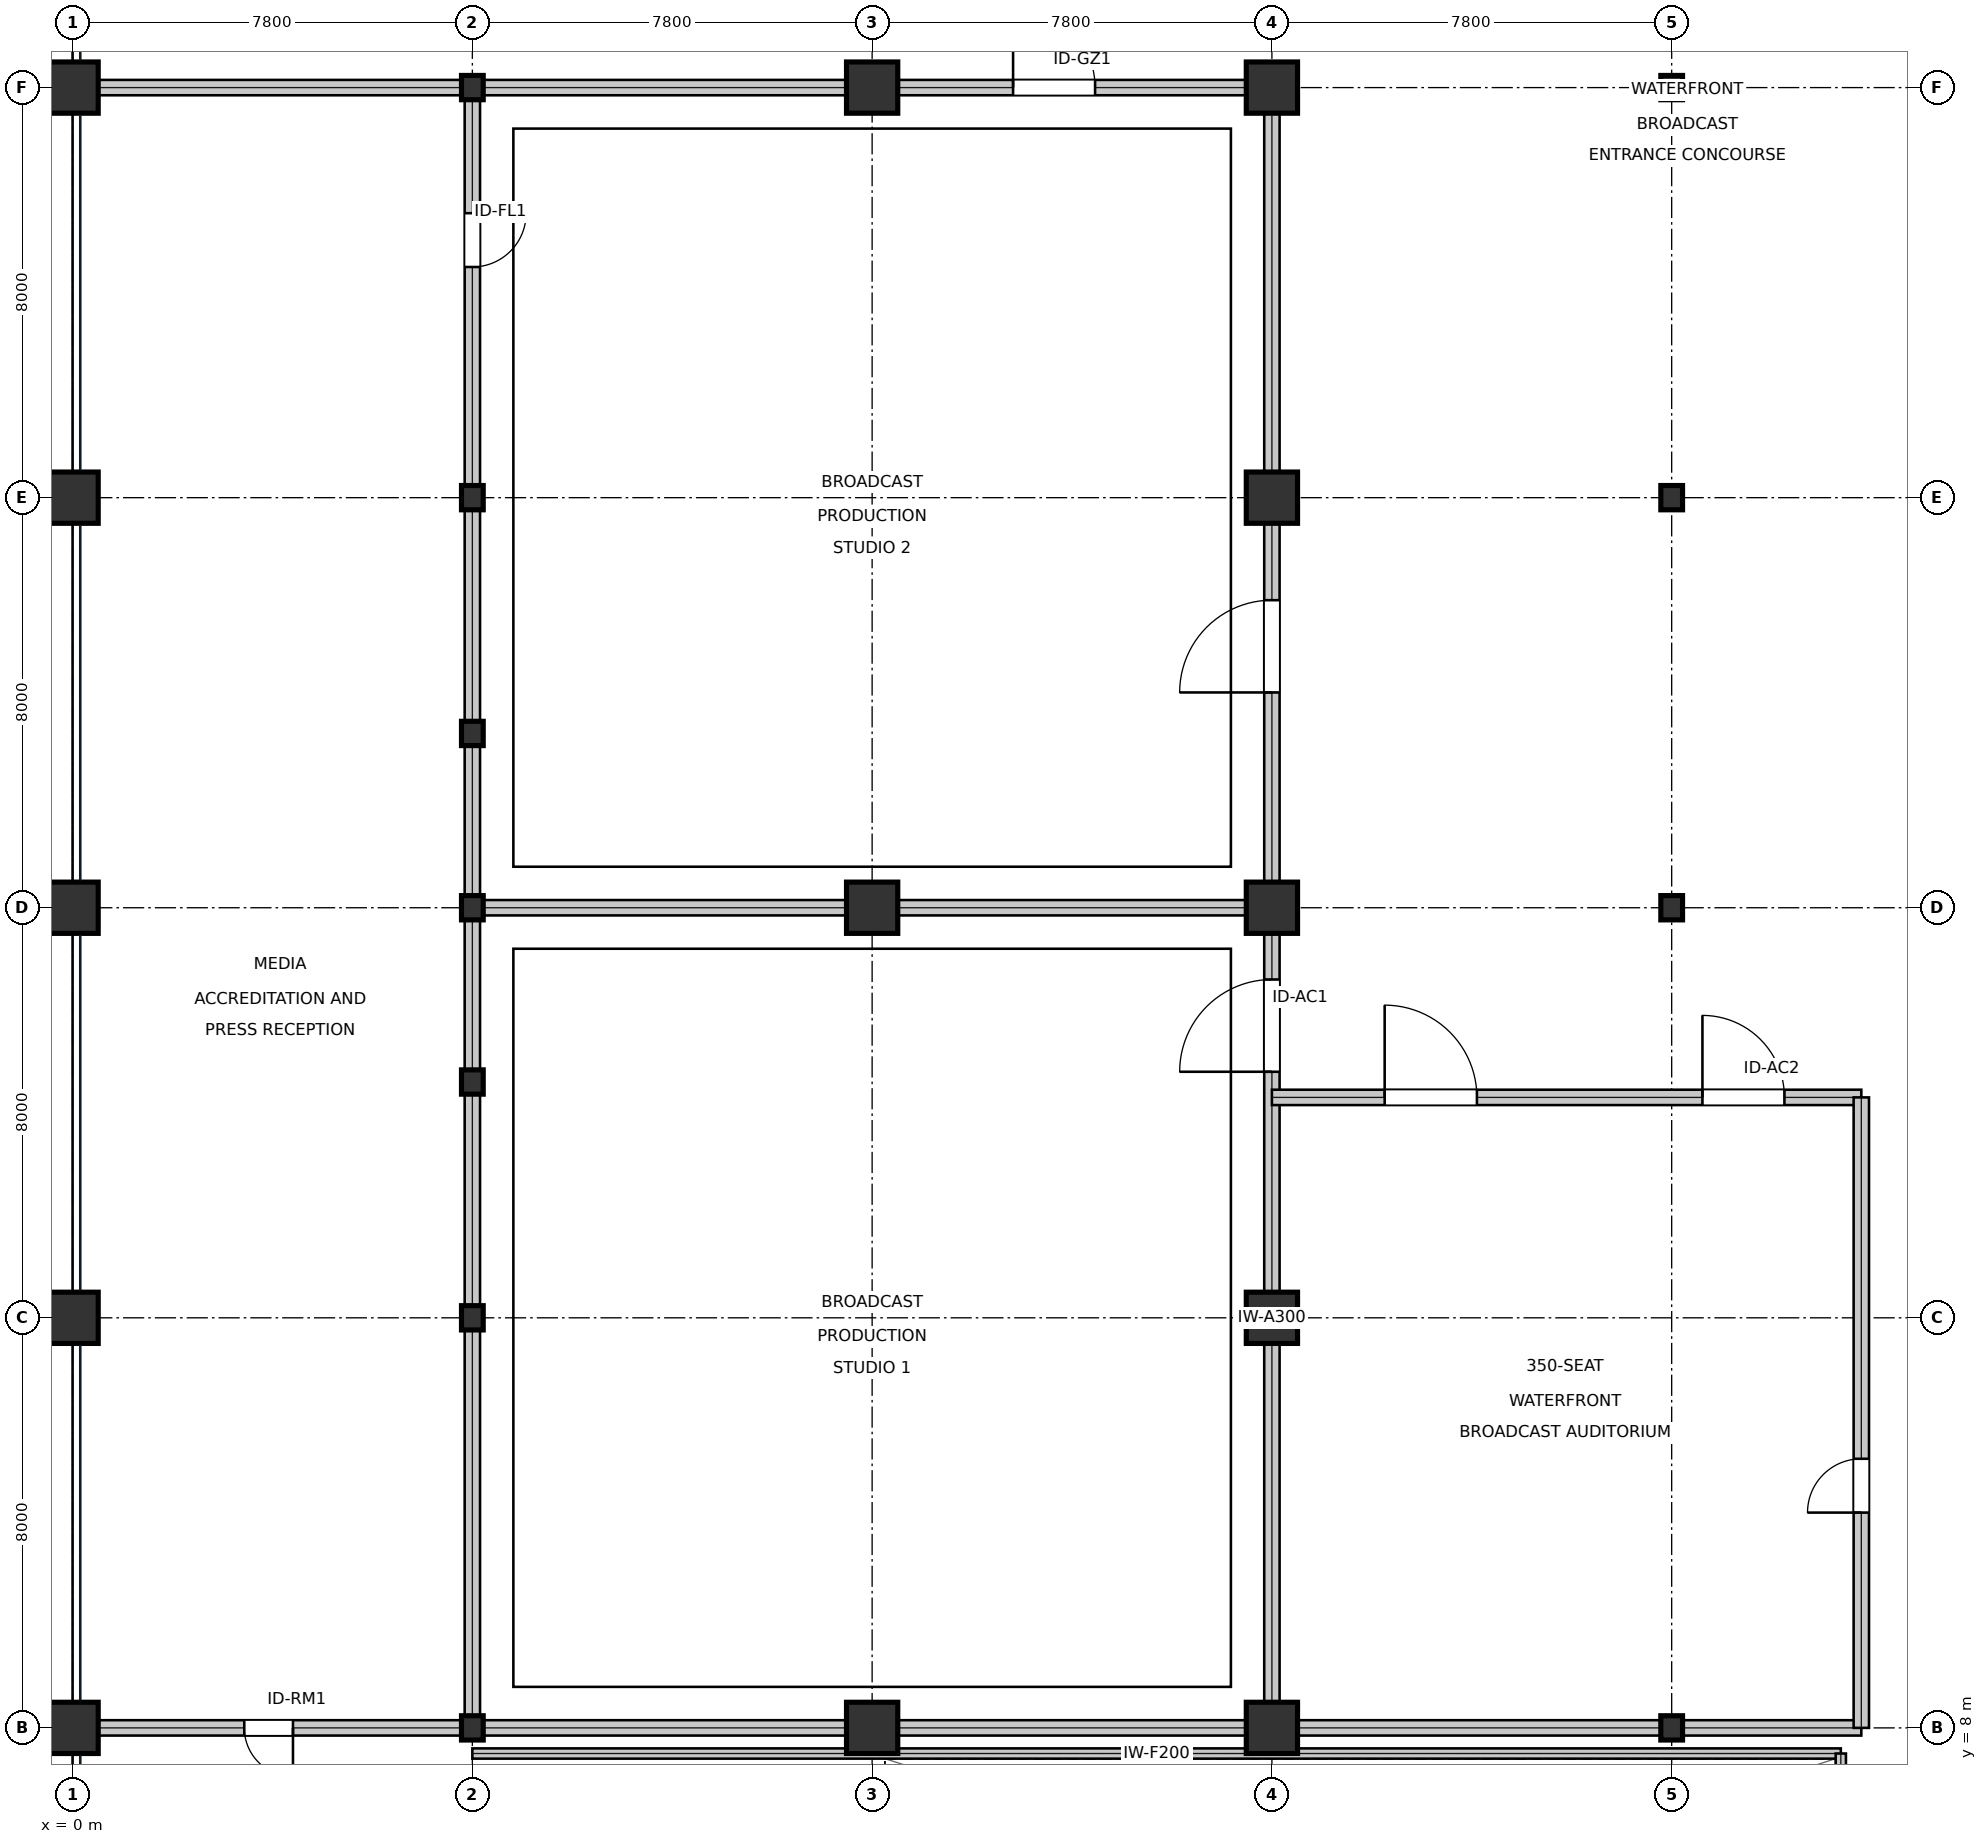
"""IFC4 building model, lengths in metres.
Left out: names, types, materials, properties, quantities, classifications, styles, units other than length and angle.
Written with IfcOpenShell. Run it as: python <this file> out.ifc"""

import sys

from ifc_helpers import new_model, si_unit, direction, frame, frame_2d, origin, origin_2d, place, context, subcontext, project, spatial, rectangle, i_section, extrude, element, fill, save


model = new_model("IFC4")
c1 = context("Model", 3, precision=1e-05, world=origin(), true_north=direction((0.0, 1.0)))
c2 = subcontext(c1, "Body", "Model", "MODEL_VIEW")
j1 = project(units=[si_unit("LENGTHUNIT", "METRE"), si_unit("PLANEANGLEUNIT", "RADIAN")], contexts=[c1])
p1 = place(None, origin())
s1 = spatial("IfcSite", under=j1, at=p1, CompositionType="ELEMENT")
p2 = place(p1, origin())
s2 = spatial("IfcBuilding", under=s1, at=p2, CompositionType="ELEMENT")
p3 = place(p2, origin())
s3 = spatial("IfcBuildingStorey", under=s2, at=p3, CompositionType="ELEMENT", Elevation=0.0)
for number, where, z_axis, x_axis in (
    (1, (0.0, 8.0, 0.0), (0.0, 0.0, 1.0), (1.0, 0.0, 0.0)),
    (2, (0.0, 16.0, 0.0), (0.0, 0.0, 1.0), (1.0, 0.0, 0.0)),
    (3, (0.0, 24.0, 0.0), (0.0, 0.0, 1.0), (1.0, 0.0, 0.0)),
    (4, (0.0, 32.0, 0.0), (0.0, 0.0, 1.0), (1.0, 0.0, 0.0)),
    (5, (0.0, 40.0, 0.0), (0.0, 0.0, 1.0), (1.0, 0.0, 0.0)),
):
    element("IfcColumn", number, at=place(p3, frame(where, z_axis=z_axis, x_axis=x_axis)), inside=s3, PredefinedType="COLUMN", context=c2, shape_type="SweptSolid", body=[
        extrude(rectangle(XDim=1.0, YDim=1.0, at=origin_2d()), origin(), (0.0, 0.0, 1.0), 5.395),
    ])
for number, where, z_axis, x_axis in (
    (6, (7.8, 8.0, 0.0), (0.0, 0.0, 1.0), (1.0, 0.0, 0.0)),
    (7, (7.8, 16.0, 0.0), (0.0, 0.0, 1.0), (1.0, 0.0, 0.0)),
    (8, (7.8, 24.0, 0.0), (0.0, 0.0, 1.0), (1.0, 0.0, 0.0)),
    (9, (7.8, 32.0, 0.0), (0.0, 0.0, 1.0), (1.0, 0.0, 0.0)),
    (10, (7.8, 40.0, 0.0), (0.0, 0.0, 1.0), (1.0, 0.0, 0.0)),
):
    element("IfcColumn", number, at=place(p3, frame(where, z_axis=z_axis, x_axis=x_axis)), inside=s3, PredefinedType="COLUMN", context=c2, shape_type="SweptSolid", body=[
        extrude(i_section(OverallWidth=0.424, OverallDepth=0.474, WebThickness=0.048, FlangeThickness=0.077, at=origin_2d()), origin(), (0.0, 0.0, 1.0), 5.395),
    ])
for number, where, z_axis, x_axis in (
    (11, (15.6, 8.0, 0.0), (0.0, 0.0, 1.0), (1.0, 0.0, 0.0)),
    (12, (15.6, 24.0, 0.0), (0.0, 0.0, 1.0), (1.0, 0.0, 0.0)),
    (13, (15.6, 40.0, 0.0), (0.0, 0.0, 1.0), (1.0, 0.0, 0.0)),
    (14, (23.4, 8.0, 0.0), (0.0, 0.0, 1.0), (1.0, 0.0, 0.0)),
    (15, (23.4, 16.0, 0.0), (0.0, 0.0, 1.0), (1.0, 0.0, 0.0)),
    (16, (23.4, 24.0, 0.0), (0.0, 0.0, 1.0), (1.0, 0.0, 0.0)),
    (17, (23.4, 32.0, 0.0), (0.0, 0.0, 1.0), (1.0, 0.0, 0.0)),
    (18, (23.4, 40.0, 0.0), (0.0, 0.0, 1.0), (1.0, 0.0, 0.0)),
):
    element("IfcColumn", number, at=place(p3, frame(where, z_axis=z_axis, x_axis=x_axis)), inside=s3, PredefinedType="COLUMN", context=c2, shape_type="SweptSolid", body=[
        extrude(rectangle(XDim=1.0, YDim=1.0, at=origin_2d()), origin(), (0.0, 0.0, 1.0), 5.395),
    ])
for number, where, z_axis, x_axis in (
    (19, (31.2, 8.0, 0.0), (0.0, 0.0, 1.0), (1.0, 0.0, 0.0)),
    (20, (31.2, 24.0, 0.0), (0.0, 0.0, 1.0), (1.0, 0.0, 0.0)),
    (21, (31.2, 32.0, 0.0), (0.0, 0.0, 1.0), (1.0, 0.0, 0.0)),
    (22, (31.2, 40.0, 0.0), (0.0, 0.0, 1.0), (1.0, 0.0, 0.0)),
):
    element("IfcColumn", number, at=place(p3, frame(where, z_axis=z_axis, x_axis=x_axis)), inside=s3, PredefinedType="COLUMN", context=c2, shape_type="SweptSolid", body=[
        extrude(i_section(OverallWidth=0.424, OverallDepth=0.474, WebThickness=0.048, FlangeThickness=0.077, at=origin_2d()), origin(), (0.0, 0.0, 1.0), 5.395),
    ])
for number, where, z_axis, x_axis in (
    (23, (7.8, 20.6, 0.0), (0.0, 0.0, 1.0), (1.0, 0.0, 0.0)),
    (24, (7.8, 27.4, 0.0), (0.0, 0.0, 1.0), (1.0, 0.0, 0.0)),
):
    element("IfcColumn", number, at=place(p3, frame(where, z_axis=z_axis, x_axis=x_axis)), inside=s3, PredefinedType="COLUMN", context=c2, shape_type="SweptSolid", body=[
        extrude(i_section(OverallWidth=0.424, OverallDepth=0.474, WebThickness=0.048, FlangeThickness=0.077, at=origin_2d()), origin(), (0.0, 0.0, 1.0), 5.394),
    ])
p4 = place(p3, frame((23.4, 8.0, 0.0), z_axis=(0.0, 0.0, 1.0), x_axis=(0.0, 1.0, 0.0)))
e25 = element("IfcWall", 25, at=p4, inside=s3, PredefinedType="PARTITIONING", context=c2, shape_type="SweptSolid", body=[
    extrude(rectangle(XDim=16.0, YDim=0.3, at=frame_2d((8.0, 0.0))), origin(), (0.0, 0.0, 1.0), 3.688),
])
p5 = place(p4, frame((12.8, 0.0, 0.0)))
e26 = element("IfcOpeningElement", 26, at=p5, cuts=e25, PredefinedType="OPENING", context=c2, shape_type="SweptSolid", body=[
    extrude(rectangle(XDim=1.8, YDim=2.4, at=frame_2d((0.9, 1.2))), frame((0.0, 0.16, 0.0), z_axis=(0.0, -1.0, 0.0), x_axis=(1.0, 0.0, 0.0)), (0.0, 0.0, 1.0), 0.32),
])
p6 = place(p3, frame((23.4, 24.0, 0.0), z_axis=(0.0, 0.0, 1.0), x_axis=(0.0, 1.0, 0.0)))
e27 = element("IfcWall", 27, at=p6, inside=s3, PredefinedType="PARTITIONING", context=c2, shape_type="SweptSolid", body=[
    extrude(rectangle(XDim=16.0, YDim=0.3, at=frame_2d((8.0, 0.0))), origin(), (0.0, 0.0, 1.0), 3.688),
])
p7 = place(p6, frame((4.2, 0.0, 0.0)))
e28 = element("IfcOpeningElement", 28, at=p7, cuts=e27, PredefinedType="OPENING", context=c2, shape_type="SweptSolid", body=[
    extrude(rectangle(XDim=1.8, YDim=2.4, at=frame_2d((0.9, 1.2))), frame((0.0, 0.16, 0.0), z_axis=(0.0, -1.0, 0.0), x_axis=(1.0, 0.0, 0.0)), (0.0, 0.0, 1.0), 0.32),
])
p8 = place(p3, frame((7.8, 24.0, 0.0), z_axis=(0.0, 0.0, 1.0), x_axis=(1.0, 0.0, 0.0)))
e29 = element("IfcWall", 29, at=p8, inside=s3, PredefinedType="PARTITIONING", context=c2, shape_type="SweptSolid", body=[
    extrude(rectangle(XDim=15.6, YDim=0.3, at=frame_2d((7.8, 0.0))), origin(), (0.0, 0.0, 1.0), 3.688),
])
p9 = place(p3, frame((7.8, 8.0, 0.0), z_axis=(0.0, 0.0, 1.0), x_axis=(0.0, 1.0, 0.0)))
e30 = element("IfcWall", 30, at=p9, inside=s3, PredefinedType="PARTITIONING", context=c2, shape_type="SweptSolid", body=[
    extrude(rectangle(XDim=32.0, YDim=0.3, at=frame_2d((16.0, 0.0))), origin(), (0.0, 0.0, 1.0), 3.688),
])
p10 = place(p9, frame((28.5, 0.0, 0.0)))
e31 = element("IfcOpeningElement", 31, at=p10, cuts=e30, PredefinedType="OPENING", context=c2, shape_type="SweptSolid", body=[
    extrude(rectangle(XDim=1.05, YDim=2.15, at=frame_2d((0.525, 1.075))), frame((0.0, 0.16, 0.0), z_axis=(0.0, -1.0, 0.0), x_axis=(1.0, 0.0, 0.0)), (0.0, 0.0, 1.0), 0.32),
])
p11 = place(p3, frame((0.15, 8.0, 0.0), z_axis=(0.0, 0.0, 1.0), x_axis=(1.0, 0.0, 0.0)))
e32 = element("IfcWall", 32, at=p11, inside=s3, PredefinedType="PARTITIONING", context=c2, shape_type="SweptSolid", body=[
    extrude(rectangle(XDim=23.25, YDim=0.3, at=frame_2d((11.625, 0.0))), origin(), (0.0, 0.0, 1.0), 3.688),
])
p12 = place(p11, frame((3.2, 0.0, 0.0)))
e33 = element("IfcOpeningElement", 33, at=p12, cuts=e32, PredefinedType="OPENING", context=c2, shape_type="SweptSolid", body=[
    extrude(rectangle(XDim=0.95, YDim=2.15, at=frame_2d((0.475, 1.075))), frame((0.0, 0.16, 0.0), z_axis=(0.0, -1.0, 0.0), x_axis=(1.0, 0.0, 0.0)), (0.0, 0.0, 1.0), 0.32),
])
p13 = place(p3, frame((0.15, 40.0, 0.0), z_axis=(0.0, 0.0, 1.0), x_axis=(1.0, 0.0, 0.0)))
e34 = element("IfcWall", 34, at=p13, inside=s3, PredefinedType="PARTITIONING", context=c2, shape_type="SweptSolid", body=[
    extrude(rectangle(XDim=23.25, YDim=0.3, at=frame_2d((11.625, 0.0))), origin(), (0.0, 0.0, 1.0), 3.688),
])
p14 = place(p13, frame((18.2, 0.0, 0.0)))
e35 = element("IfcOpeningElement", 35, at=p14, cuts=e34, PredefinedType="OPENING", context=c2, shape_type="SweptSolid", body=[
    extrude(rectangle(XDim=1.6, YDim=2.2, at=frame_2d((0.8, 1.1))), frame((0.0, 0.16, 0.0), z_axis=(0.0, -1.0, 0.0), x_axis=(1.0, 0.0, 0.0)), (0.0, 0.0, 1.0), 0.32),
])
p15 = place(p3, frame((23.4, 20.3, 0.0), z_axis=(0.0, 0.0, 1.0), x_axis=(1.0, 0.0, 0.0)))
e36 = element("IfcWall", 36, at=p15, inside=s3, PredefinedType="PARTITIONING", context=c2, shape_type="SweptSolid", body=[
    extrude(rectangle(XDim=11.5, YDim=0.3, at=frame_2d((5.75, 0.0))), origin(), (0.0, 0.0, 1.0), 3.688),
])
p16 = place(p15, frame((2.2, 0.0, 0.0)))
e37 = element("IfcOpeningElement", 37, at=p16, cuts=e36, PredefinedType="OPENING", context=c2, shape_type="SweptSolid", body=[
    extrude(rectangle(XDim=1.8, YDim=2.4, at=frame_2d((0.9, 1.2))), frame((0.0, 0.16, 0.0), z_axis=(0.0, -1.0, 0.0), x_axis=(1.0, 0.0, 0.0)), (0.0, 0.0, 1.0), 0.32),
])
p17 = place(p15, frame((8.4, 0.0, 0.0)))
e38 = element("IfcOpeningElement", 38, at=p17, cuts=e36, PredefinedType="OPENING", context=c2, shape_type="SweptSolid", body=[
    extrude(rectangle(XDim=1.6, YDim=2.4, at=frame_2d((0.8, 1.2))), frame((0.0, 0.16, 0.0), z_axis=(0.0, -1.0, 0.0), x_axis=(1.0, 0.0, 0.0)), (0.0, 0.0, 1.0), 0.32),
])
p18 = place(p3, frame((23.4, 8.0, 0.0), z_axis=(0.0, 0.0, 1.0), x_axis=(1.0, 0.0, 0.0)))
e39 = element("IfcWall", 39, at=p18, inside=s3, PredefinedType="PARTITIONING", context=c2, shape_type="SweptSolid", body=[
    extrude(rectangle(XDim=11.5, YDim=0.3, at=frame_2d((5.75, 0.0))), origin(), (0.0, 0.0, 1.0), 3.688),
])
p19 = place(p3, frame((34.9, 8.0, 0.0), z_axis=(0.0, 0.0, 1.0), x_axis=(0.0, 1.0, 0.0)))
e40 = element("IfcWall", 40, at=p19, inside=s3, PredefinedType="PARTITIONING", context=c2, shape_type="SweptSolid", body=[
    extrude(rectangle(XDim=12.3, YDim=0.3, at=frame_2d((6.15, 0.0))), origin(), (0.0, 0.0, 1.0), 3.688),
])
p20 = place(p19, frame((4.2, 0.0, 0.0)))
e41 = element("IfcOpeningElement", 41, at=p20, cuts=e40, PredefinedType="OPENING", context=c2, shape_type="SweptSolid", body=[
    extrude(rectangle(XDim=1.05, YDim=2.15, at=frame_2d((0.525, 1.075))), frame((0.0, 0.16, 0.0), z_axis=(0.0, -1.0, 0.0), x_axis=(1.0, 0.0, 0.0)), (0.0, 0.0, 1.0), 0.32),
])
p21 = place(p3, frame((7.8, 7.5, 0.0), z_axis=(0.0, 0.0, 1.0), x_axis=(1.0, 0.0, 0.0)))
e42 = element("IfcWall", 42, at=p21, inside=s3, PredefinedType="SOLIDWALL", context=c2, shape_type="SweptSolid", body=[
    extrude(rectangle(XDim=26.7, YDim=0.2, at=frame_2d((13.35, 0.0))), origin(), (0.0, 0.0, 1.0), 4.415),
])
p22 = place(p3, frame((34.5, 1.3, 0.0), z_axis=(0.0, 0.0, 1.0), x_axis=(0.0, 1.0, 0.0)))
e43 = element("IfcWall", 43, at=p22, inside=s3, PredefinedType="SOLIDWALL", context=c2, shape_type="SweptSolid", body=[
    extrude(rectangle(XDim=6.2, YDim=0.2, at=frame_2d((3.1, 0.0))), origin(), (0.0, 0.0, 1.0), 4.701),
])
p23 = place(p5, origin())
e44 = element("IfcDoor", 44, at=p23, inside=s3, OperationType="SINGLE_SWING_LEFT", PredefinedType="DOOR", context=c2, shape_type="SweptSolid", body=[
    extrude(rectangle(XDim=1.8, YDim=2.4, at=frame_2d((0.9, 1.2))), frame((0.0, 0.025, 0.0), z_axis=(0.0, -1.0, 0.0), x_axis=(1.0, 0.0, 0.0)), (0.0, 0.0, 1.0), 0.05),
])
fill(e26, e44)
p24 = place(p7, origin())
e45 = element("IfcDoor", 45, at=p24, inside=s3, OperationType="SINGLE_SWING_LEFT", PredefinedType="DOOR", context=c2, shape_type="SweptSolid", body=[
    extrude(rectangle(XDim=1.8, YDim=2.4, at=frame_2d((0.9, 1.2))), frame((0.0, 0.025, 0.0), z_axis=(0.0, -1.0, 0.0), x_axis=(1.0, 0.0, 0.0)), (0.0, 0.0, 1.0), 0.05),
])
fill(e28, e45)
p25 = place(p10, frame((1.05, 0.0, 0.0), z_axis=(0.0, 0.0, 1.0), x_axis=(-1.0, 0.0, 0.0)))
e46 = element("IfcDoor", 46, at=p25, inside=s3, OperationType="SINGLE_SWING_LEFT", PredefinedType="DOOR", context=c2, shape_type="SweptSolid", body=[
    extrude(rectangle(XDim=1.05, YDim=2.15, at=frame_2d((0.525, 1.075))), frame((0.0, 0.025, 0.0), z_axis=(0.0, -1.0, 0.0), x_axis=(1.0, 0.0, 0.0)), (0.0, 0.0, 1.0), 0.05),
])
fill(e31, e46)
p26 = place(p12, frame((0.95, 0.0, 0.0), z_axis=(0.0, 0.0, 1.0), x_axis=(-1.0, 0.0, 0.0)))
e47 = element("IfcDoor", 47, at=p26, inside=s3, OperationType="SINGLE_SWING_LEFT", PredefinedType="DOOR", context=c2, shape_type="SweptSolid", body=[
    extrude(rectangle(XDim=0.95, YDim=2.15, at=frame_2d((0.475, 1.075))), frame((0.0, 0.025, 0.0), z_axis=(0.0, -1.0, 0.0), x_axis=(1.0, 0.0, 0.0)), (0.0, 0.0, 1.0), 0.05),
])
fill(e33, e47)
p27 = place(p14, origin())
e48 = element("IfcDoor", 48, at=p27, inside=s3, OperationType="SINGLE_SWING_LEFT", PredefinedType="DOOR", context=c2, shape_type="SweptSolid", body=[
    extrude(rectangle(XDim=1.6, YDim=2.2, at=frame_2d((0.8, 1.1))), frame((0.0, 0.025, 0.0), z_axis=(0.0, -1.0, 0.0), x_axis=(1.0, 0.0, 0.0)), (0.0, 0.0, 1.0), 0.05),
])
fill(e35, e48)
p28 = place(p16, origin())
e49 = element("IfcDoor", 49, at=p28, inside=s3, OperationType="SINGLE_SWING_LEFT", PredefinedType="DOOR", context=c2, shape_type="SweptSolid", body=[
    extrude(rectangle(XDim=1.8, YDim=2.4, at=frame_2d((0.9, 1.2))), frame((0.0, 0.025, 0.0), z_axis=(0.0, -1.0, 0.0), x_axis=(1.0, 0.0, 0.0)), (0.0, 0.0, 1.0), 0.05),
])
fill(e37, e49)
p29 = place(p17, origin())
e50 = element("IfcDoor", 50, at=p29, inside=s3, OperationType="SINGLE_SWING_LEFT", PredefinedType="DOOR", context=c2, shape_type="SweptSolid", body=[
    extrude(rectangle(XDim=1.6, YDim=2.4, at=frame_2d((0.8, 1.2))), frame((0.0, 0.025, 0.0), z_axis=(0.0, -1.0, 0.0), x_axis=(1.0, 0.0, 0.0)), (0.0, 0.0, 1.0), 0.05),
])
fill(e38, e50)
p30 = place(p20, origin())
e51 = element("IfcDoor", 51, at=p30, inside=s3, OperationType="SINGLE_SWING_LEFT", PredefinedType="DOOR", context=c2, shape_type="SweptSolid", body=[
    extrude(rectangle(XDim=1.05, YDim=2.15, at=frame_2d((0.525, 1.075))), frame((0.0, 0.025, 0.0), z_axis=(0.0, -1.0, 0.0), x_axis=(1.0, 0.0, 0.0)), (0.0, 0.0, 1.0), 0.05),
])
fill(e41, e51)
save(model, sys.argv[1])
